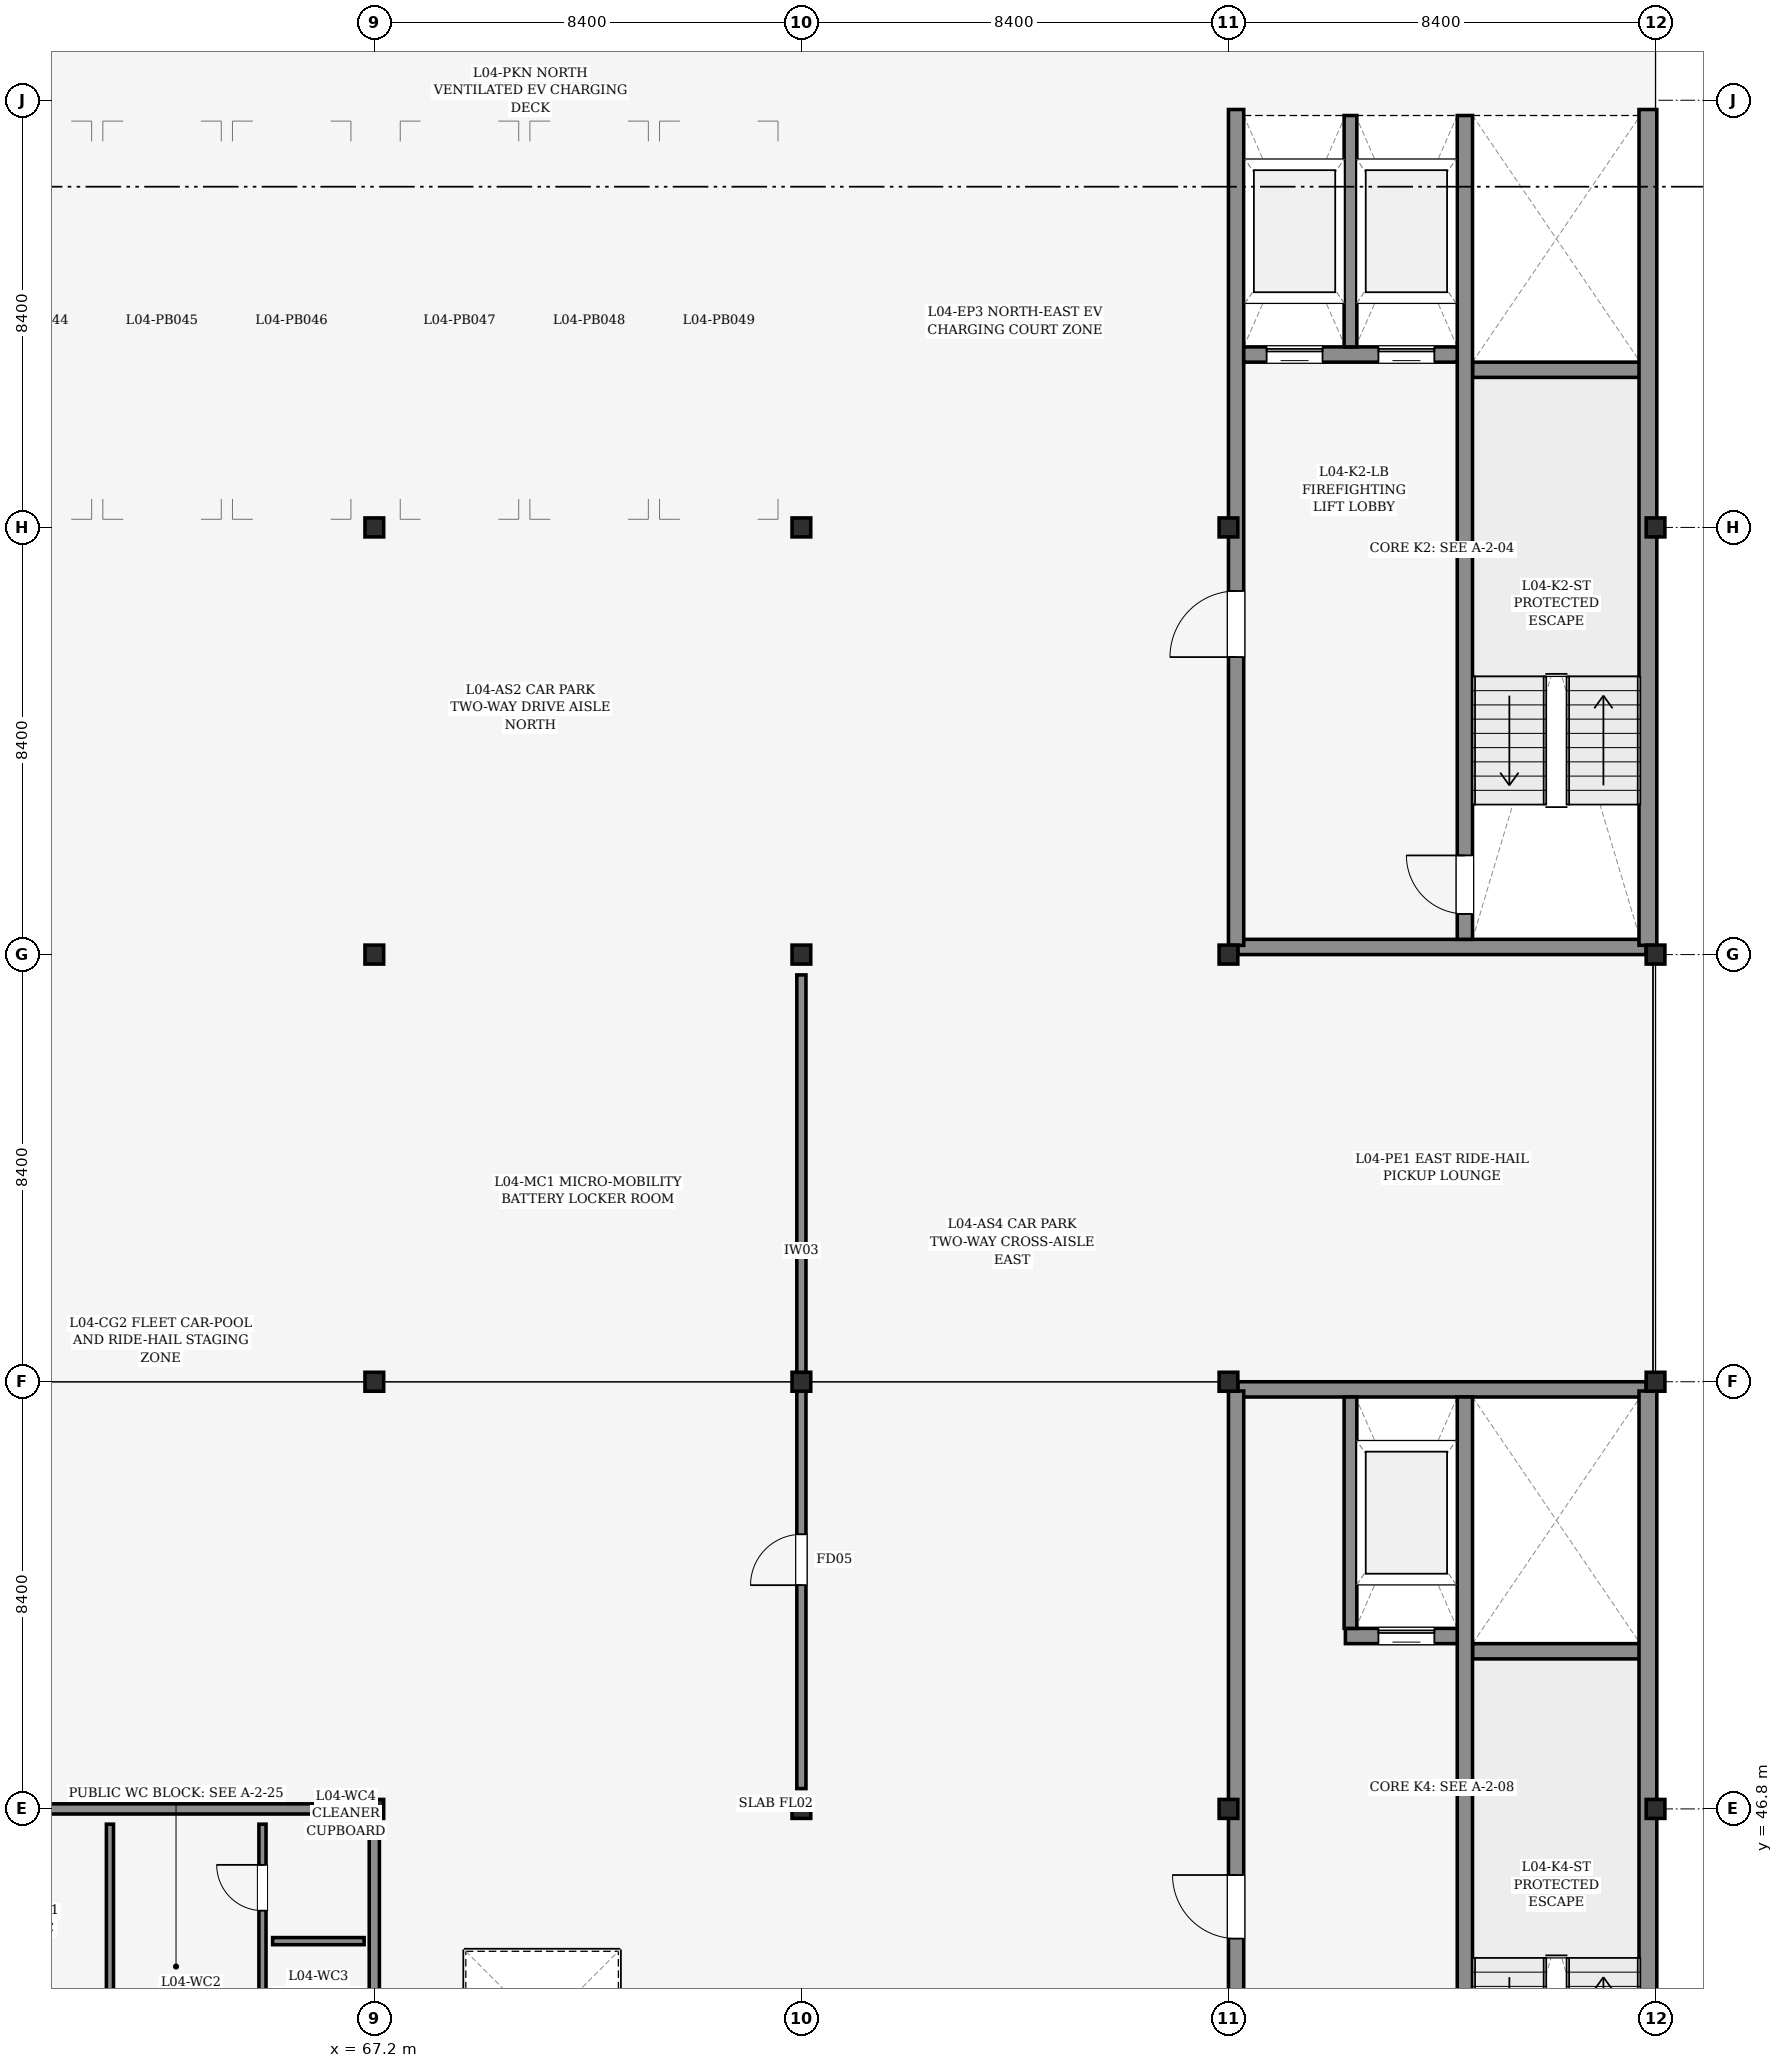
"""IFC4 building model, lengths in metres.
Left out: names, types, materials, properties, quantities, classifications, styles, units other than length and angle.
Written with IfcOpenShell. Run it as: python <this file> out.ifc"""

import sys

from ifc_helpers import new_model, si_unit, direction, frame, frame_2d, origin, origin_2d, place, context, subcontext, project, spatial, rectangle, i_section, extrude, element, fill, save


model = new_model("IFC4")
c1 = context("Model", 3, precision=1e-05, world=origin(), true_north=direction((0.0, 1.0)))
c2 = subcontext(c1, "Body", "Model", "MODEL_VIEW")
j1 = project(units=[si_unit("LENGTHUNIT", "METRE"), si_unit("PLANEANGLEUNIT", "RADIAN")], contexts=[c1])
p1 = place(None, origin())
s1 = spatial("IfcSite", under=j1, at=p1, CompositionType="ELEMENT")
p2 = place(p1, origin())
s2 = spatial("IfcBuilding", under=s1, at=p2, CompositionType="ELEMENT")
p3 = place(p2, frame((0.0, 0.0, 16.2)))
s3 = spatial("IfcBuildingStorey", under=s2, at=p3, CompositionType="ELEMENT", Elevation=16.2)
for number, where, z_axis, x_axis in (
    (1, (67.2, 46.8, 0.0), (0.0, 0.0, 1.0), (1.0, 0.0, 0.0)),
    (2, (67.2, 55.2, 0.0), (0.0, 0.0, 1.0), (1.0, 0.0, 0.0)),
    (3, (67.2, 63.6, 0.0), (0.0, 0.0, 1.0), (1.0, 0.0, 0.0)),
    (4, (67.2, 72.0, 0.0), (0.0, 0.0, 1.0), (1.0, 0.0, 0.0)),
    (5, (67.2, 80.4, 0.0), (0.0, 0.0, 1.0), (1.0, 0.0, 0.0)),
    (6, (75.6, 46.8, 0.0), (0.0, 0.0, 1.0), (1.0, 0.0, 0.0)),
    (7, (75.6, 55.2, 0.0), (0.0, 0.0, 1.0), (1.0, 0.0, 0.0)),
    (8, (75.6, 63.6, 0.0), (0.0, 0.0, 1.0), (1.0, 0.0, 0.0)),
    (9, (75.6, 72.0, 0.0), (0.0, 0.0, 1.0), (1.0, 0.0, 0.0)),
    (10, (75.6, 80.4, 0.0), (0.0, 0.0, 1.0), (1.0, 0.0, 0.0)),
    (11, (84.0, 46.8, 0.0), (0.0, 0.0, 1.0), (1.0, 0.0, 0.0)),
    (12, (84.0, 55.2, 0.0), (0.0, 0.0, 1.0), (1.0, 0.0, 0.0)),
    (13, (84.0, 63.6, 0.0), (0.0, 0.0, 1.0), (1.0, 0.0, 0.0)),
    (14, (84.0, 72.0, 0.0), (0.0, 0.0, 1.0), (1.0, 0.0, 0.0)),
    (15, (84.0, 80.4, 0.0), (0.0, 0.0, 1.0), (1.0, 0.0, 0.0)),
    (16, (92.4, 46.8, 0.0), (0.0, 0.0, 1.0), (1.0, 0.0, 0.0)),
    (17, (92.4, 55.2, 0.0), (0.0, 0.0, 1.0), (1.0, 0.0, 0.0)),
    (18, (92.4, 63.6, 0.0), (0.0, 0.0, 1.0), (1.0, 0.0, 0.0)),
    (19, (92.4, 72.0, 0.0), (0.0, 0.0, 1.0), (1.0, 0.0, 0.0)),
    (20, (92.4, 80.4, 0.0), (0.0, 0.0, 1.0), (1.0, 0.0, 0.0)),
):
    element("IfcColumn", number, at=place(p3, frame(where, z_axis=z_axis, x_axis=x_axis)), inside=s3, PredefinedType="COLUMN", context=c2, shape_type="SweptSolid", body=[
        extrude(i_section(OverallWidth=0.373, OverallDepth=0.368, WebThickness=0.014, FlangeThickness=0.024, FilletRadius=0.015, at=origin_2d()), origin(), (0.0, 0.0, 1.0), 3.6),
    ])
for number, where, z_axis, x_axis in (
    (21, (84.185, 63.75, 0.0), (0.0, 0.0, 1.0), (1.0, 0.0, 0.0)),
    (22, (84.185, 80.25, 0.0), (0.0, 0.0, 1.0), (1.0, 0.0, 0.0)),
):
    element("IfcWall", number, at=place(p3, frame(where, z_axis=z_axis, x_axis=x_axis)), inside=s3, PredefinedType="SHEAR", context=c2, shape_type="SweptSolid", body=[
        extrude(rectangle(XDim=8.031, YDim=0.3, at=frame_2d((4.016, 0.0))), origin(), (0.0, 0.0, 1.0), 3.38),
    ])
p4 = place(p3, frame((88.8, 75.1, 0.0), z_axis=(0.0, 0.0, 1.0), x_axis=(1.0, 0.0, 0.0)))
e23 = element("IfcWall", 23, at=p4, inside=s3, PredefinedType="SHEAR", context=c2, shape_type="SweptSolid", body=[
    extrude(rectangle(XDim=3.3, YDim=0.3, at=frame_2d((1.65, 0.0))), origin(), (0.0, 0.0, 1.0), 3.38),
])
p5 = place(p3, frame((92.25, 63.782, 0.0), z_axis=(0.0, 0.0, 1.0), x_axis=(0.0, 1.0, 0.0)))
e24 = element("IfcWall", 24, at=p5, inside=s3, PredefinedType="SHEAR", context=c2, shape_type="SweptSolid", body=[
    extrude(rectangle(XDim=16.436, YDim=0.35, at=frame_2d((8.218, 0.0))), origin(), (0.0, 0.0, 1.0), 3.38),
])
p6 = place(p3, frame((84.15, 63.782, 0.0), z_axis=(0.0, 0.0, 1.0), x_axis=(0.0, 1.0, 0.0)))
e25 = element("IfcWall", 25, at=p6, inside=s3, PredefinedType="SHEAR", context=c2, shape_type="SweptSolid", body=[
    extrude(rectangle(XDim=16.436, YDim=0.3, at=frame_2d((8.218, 0.0))), origin(), (0.0, 0.0, 1.0), 3.38),
])
p7 = place(p6, frame((5.668, 0.0, 0.0)))
e26 = element("IfcOpeningElement", 26, at=p7, cuts=e25, PredefinedType="OPENING", context=c2, shape_type="SweptSolid", body=[
    extrude(rectangle(XDim=1.3, YDim=2.2, at=frame_2d((0.65, 1.1))), frame((0.0, 0.16, 0.0), z_axis=(0.0, -1.0, 0.0), x_axis=(1.0, 0.0, 0.0)), (0.0, 0.0, 1.0), 0.32),
])
p8 = place(p3, frame((88.65, 63.9, 0.0), z_axis=(0.0, 0.0, 1.0), x_axis=(0.0, 1.0, 0.0)))
e27 = element("IfcWall", 27, at=p8, inside=s3, PredefinedType="SHEAR", context=c2, shape_type="SweptSolid", body=[
    extrude(rectangle(XDim=16.2, YDim=0.3, at=frame_2d((8.1, 0.0))), origin(), (0.0, 0.0, 1.0), 3.38),
])
p9 = place(p8, frame((0.5, 0.0, 0.0)))
e28 = element("IfcOpeningElement", 28, at=p9, cuts=e27, PredefinedType="OPENING", context=c2, shape_type="SweptSolid", body=[
    extrude(rectangle(XDim=1.15, YDim=2.15, at=frame_2d((0.575, 1.075))), frame((0.0, 0.16, 0.0), z_axis=(0.0, -1.0, 0.0), x_axis=(1.0, 0.0, 0.0)), (0.0, 0.0, 1.0), 0.32),
])
p10 = place(p3, frame((84.3, 75.4, 0.0), z_axis=(0.0, 0.0, 1.0), x_axis=(1.0, 0.0, 0.0)))
e29 = element("IfcWall", 29, at=p10, inside=s3, PredefinedType="SHEAR", context=c2, shape_type="SweptSolid", body=[
    extrude(rectangle(XDim=4.2, YDim=0.3, at=frame_2d((2.1, 0.0))), origin(), (0.0, 0.0, 1.0), 3.38),
])
p11 = place(p10, frame((0.45, 0.0, 0.0)))
e30 = element("IfcOpeningElement", 30, at=p11, cuts=e29, PredefinedType="OPENING", context=c2, shape_type="SweptSolid", body=[
    extrude(rectangle(XDim=1.1, YDim=2.2, at=frame_2d((0.55, 1.1))), frame((0.0, 0.16, 0.0), z_axis=(0.0, -1.0, 0.0), x_axis=(1.0, 0.0, 0.0)), (0.0, 0.0, 1.0), 0.32),
])
p12 = place(p10, frame((2.65, 0.0, 0.0)))
e31 = element("IfcOpeningElement", 31, at=p12, cuts=e29, PredefinedType="OPENING", context=c2, shape_type="SweptSolid", body=[
    extrude(rectangle(XDim=1.1, YDim=2.2, at=frame_2d((0.55, 1.1))), frame((0.0, 0.16, 0.0), z_axis=(0.0, -1.0, 0.0), x_axis=(1.0, 0.0, 0.0)), (0.0, 0.0, 1.0), 0.32),
])
p13 = place(p3, frame((86.4, 75.55, 0.0), z_axis=(0.0, 0.0, 1.0), x_axis=(0.0, 1.0, 0.0)))
e32 = element("IfcWall", 32, at=p13, inside=s3, PredefinedType="PARTITIONING", context=c2, shape_type="SweptSolid", body=[
    extrude(rectangle(XDim=4.55, YDim=0.25, at=frame_2d((2.275, 0.0))), origin(), (0.0, 0.0, 1.0), 2.525),
])
p14 = place(p3, frame((84.185, 55.05, 0.0), z_axis=(0.0, 0.0, 1.0), x_axis=(1.0, 0.0, 0.0)))
e33 = element("IfcWall", 33, at=p14, inside=s3, PredefinedType="SHEAR", context=c2, shape_type="SweptSolid", body=[
    extrude(rectangle(XDim=8.031, YDim=0.3, at=frame_2d((4.016, 0.0))), origin(), (0.0, 0.0, 1.0), 3.38),
])
p15 = place(p3, frame((88.8, 49.9, 0.0), z_axis=(0.0, 0.0, 1.0), x_axis=(1.0, 0.0, 0.0)))
e34 = element("IfcWall", 34, at=p15, inside=s3, PredefinedType="SHEAR", context=c2, shape_type="SweptSolid", body=[
    extrude(rectangle(XDim=3.3, YDim=0.3, at=frame_2d((1.65, 0.0))), origin(), (0.0, 0.0, 1.0), 3.38),
])
p16 = place(p3, frame((92.25, 38.582, 0.0), z_axis=(0.0, 0.0, 1.0), x_axis=(0.0, 1.0, 0.0)))
e35 = element("IfcWall", 35, at=p16, inside=s3, PredefinedType="SHEAR", context=c2, shape_type="SweptSolid", body=[
    extrude(rectangle(XDim=16.436, YDim=0.35, at=frame_2d((8.218, 0.0))), origin(), (0.0, 0.0, 1.0), 3.38),
])
p17 = place(p3, frame((84.15, 38.582, 0.0), z_axis=(0.0, 0.0, 1.0), x_axis=(0.0, 1.0, 0.0)))
e36 = element("IfcWall", 36, at=p17, inside=s3, PredefinedType="SHEAR", context=c2, shape_type="SweptSolid", body=[
    extrude(rectangle(XDim=16.436, YDim=0.3, at=frame_2d((8.218, 0.0))), origin(), (0.0, 0.0, 1.0), 3.38),
])
p18 = place(p17, frame((5.668, 0.0, 0.0)))
e37 = element("IfcOpeningElement", 37, at=p18, cuts=e36, PredefinedType="OPENING", context=c2, shape_type="SweptSolid", body=[
    extrude(rectangle(XDim=1.25, YDim=2.15, at=frame_2d((0.625, 1.075))), frame((0.0, 0.16, 0.0), z_axis=(0.0, -1.0, 0.0), x_axis=(1.0, 0.0, 0.0)), (0.0, 0.0, 1.0), 0.32),
])
p19 = place(p3, frame((88.65, 38.7, 0.0), z_axis=(0.0, 0.0, 1.0), x_axis=(0.0, 1.0, 0.0)))
e38 = element("IfcWall", 38, at=p19, inside=s3, PredefinedType="SHEAR", context=c2, shape_type="SweptSolid", body=[
    extrude(rectangle(XDim=16.2, YDim=0.3, at=frame_2d((8.1, 0.0))), origin(), (0.0, 0.0, 1.0), 3.38),
])
p20 = place(p19, frame((0.5, 0.0, 0.0)))
e39 = element("IfcOpeningElement", 39, at=p20, cuts=e38, PredefinedType="OPENING", context=c2, shape_type="SweptSolid", body=[
    extrude(rectangle(XDim=1.15, YDim=2.15, at=frame_2d((0.575, 1.075))), frame((0.0, 0.16, 0.0), z_axis=(0.0, -1.0, 0.0), x_axis=(1.0, 0.0, 0.0)), (0.0, 0.0, 1.0), 0.32),
])
p21 = place(p3, frame((86.3, 50.2, 0.0), z_axis=(0.0, 0.0, 1.0), x_axis=(1.0, 0.0, 0.0)))
e40 = element("IfcWall", 40, at=p21, inside=s3, PredefinedType="SHEAR", context=c2, shape_type="SweptSolid", body=[
    extrude(rectangle(XDim=2.2, YDim=0.3, at=frame_2d((1.1, 0.0))), origin(), (0.0, 0.0, 1.0), 3.38),
])
p22 = place(p21, frame((0.65, 0.0, 0.0)))
e41 = element("IfcOpeningElement", 41, at=p22, cuts=e40, PredefinedType="OPENING", context=c2, shape_type="SweptSolid", body=[
    extrude(rectangle(XDim=1.1, YDim=2.2, at=frame_2d((0.55, 1.1))), frame((0.0, 0.16, 0.0), z_axis=(0.0, -1.0, 0.0), x_axis=(1.0, 0.0, 0.0)), (0.0, 0.0, 1.0), 0.32),
])
p23 = place(p3, frame((86.4, 50.35, 0.0), z_axis=(0.0, 0.0, 1.0), x_axis=(0.0, 1.0, 0.0)))
e42 = element("IfcWall", 42, at=p23, inside=s3, PredefinedType="PARTITIONING", context=c2, shape_type="SweptSolid", body=[
    extrude(rectangle(XDim=4.55, YDim=0.25, at=frame_2d((2.275, 0.0))), origin(), (0.0, 0.0, 1.0), 2.525),
])
p24 = place(p3, frame((59.2, 46.8, 0.0), z_axis=(0.0, 0.0, 1.0), x_axis=(1.0, 0.0, 0.0)))
e43 = element("IfcWall", 43, at=p24, inside=s3, PredefinedType="PARTITIONING", context=c2, shape_type="SweptSolid", body=[
    extrude(rectangle(XDim=7.6, YDim=0.2, at=frame_2d((3.8, 0.0))), origin(), (0.0, 0.0, 1.0), 2.525),
])
p25 = place(p3, frame((67.2, 38.8, 0.0), z_axis=(0.0, 0.0, 1.0), x_axis=(0.0, 1.0, 0.0)))
e44 = element("IfcWall", 44, at=p25, inside=s3, PredefinedType="PARTITIONING", context=c2, shape_type="SweptSolid", body=[
    extrude(rectangle(XDim=7.6, YDim=0.2, at=frame_2d((3.8, 0.0))), origin(), (0.0, 0.0, 1.0), 2.525),
])
p26 = place(p3, frame((62.0, 40.8, 0.0), z_axis=(0.0, 0.0, 1.0), x_axis=(0.0, 1.0, 0.0)))
e45 = element("IfcWall", 45, at=p26, inside=s3, PredefinedType="PARTITIONING", context=c2, shape_type="SweptSolid", body=[
    extrude(rectangle(XDim=5.7, YDim=0.14, at=frame_2d((2.85, 0.0))), origin(), (0.0, 0.0, 1.0), 2.525),
])
p27 = place(p3, frame((65.0, 40.8, 0.0), z_axis=(0.0, 0.0, 1.0), x_axis=(0.0, 1.0, 0.0)))
e46 = element("IfcWall", 46, at=p27, inside=s3, PredefinedType="PARTITIONING", context=c2, shape_type="SweptSolid", body=[
    extrude(rectangle(XDim=5.7, YDim=0.14, at=frame_2d((2.85, 0.0))), origin(), (0.0, 0.0, 1.0), 2.525),
])
p28 = place(p27, frame((4.0, 0.0, 0.0)))
e47 = element("IfcOpeningElement", 47, at=p28, cuts=e46, PredefinedType="OPENING", context=c2, shape_type="SweptSolid", body=[
    extrude(rectangle(XDim=0.9, YDim=2.05, at=frame_2d((0.45, 1.025))), frame((0.0, 0.08, 0.0), z_axis=(0.0, -1.0, 0.0), x_axis=(1.0, 0.0, 0.0)), (0.0, 0.0, 1.0), 0.16),
])
p29 = place(p3, frame((65.2, 44.2, 0.0), z_axis=(0.0, 0.0, 1.0), x_axis=(1.0, 0.0, 0.0)))
e48 = element("IfcWall", 48, at=p29, inside=s3, PredefinedType="PARTITIONING", context=c2, shape_type="SweptSolid", body=[
    extrude(rectangle(XDim=1.8, YDim=0.14, at=frame_2d((0.9, 0.0))), origin(), (0.0, 0.0, 1.0), 2.525),
])
p30 = place(p3, frame((75.6, 47.2, 0.0), z_axis=(0.0, 0.0, 1.0), x_axis=(0.0, 1.0, 0.0)))
e49 = element("IfcWall", 49, at=p30, inside=s3, PredefinedType="PARTITIONING", context=c2, shape_type="SweptSolid", body=[
    extrude(rectangle(XDim=16.0, YDim=0.18, at=frame_2d((8.0, 0.0))), origin(), (0.0, 0.0, 1.0), 2.525),
])
p31 = place(p30, frame((4.0, 0.0, 0.0)))
e50 = element("IfcOpeningElement", 50, at=p31, cuts=e49, PredefinedType="OPENING", context=c2, shape_type="SweptSolid", body=[
    extrude(rectangle(XDim=1.0, YDim=2.15, at=frame_2d((0.5, 1.075))), frame((0.0, 0.1, 0.0), z_axis=(0.0, -1.0, 0.0), x_axis=(1.0, 0.0, 0.0)), (0.0, 0.0, 1.0), 0.2),
])
p32 = place(p7, origin())
e51 = element("IfcDoor", 51, at=p32, inside=s3, OperationType="SINGLE_SWING_LEFT", PredefinedType="DOOR", context=c2, shape_type="SweptSolid", body=[
    extrude(rectangle(XDim=1.3, YDim=2.2, at=frame_2d((0.65, 1.1))), frame((0.0, 0.025, 0.0), z_axis=(0.0, -1.0, 0.0), x_axis=(1.0, 0.0, 0.0)), (0.0, 0.0, 1.0), 0.05),
])
fill(e26, e51)
p33 = place(p9, origin())
e52 = element("IfcDoor", 52, at=p33, inside=s3, OperationType="SINGLE_SWING_RIGHT", PredefinedType="DOOR", context=c2, shape_type="SweptSolid", body=[
    extrude(rectangle(XDim=1.15, YDim=2.15, at=frame_2d((0.575, 1.075))), frame((0.0, 0.025, 0.0), z_axis=(0.0, -1.0, 0.0), x_axis=(1.0, 0.0, 0.0)), (0.0, 0.0, 1.0), 0.05),
])
fill(e28, e52)
p34 = place(p11, origin())
e53 = element("IfcDoor", 53, at=p34, inside=s3, OperationType="SLIDING_TO_LEFT", PredefinedType="DOOR", context=c2, shape_type="SweptSolid", body=[
    extrude(rectangle(XDim=1.1, YDim=2.2, at=frame_2d((0.55, 1.1))), frame((0.0, 0.025, 0.0), z_axis=(0.0, -1.0, 0.0), x_axis=(1.0, 0.0, 0.0)), (0.0, 0.0, 1.0), 0.05),
])
fill(e30, e53)
p35 = place(p12, origin())
e54 = element("IfcDoor", 54, at=p35, inside=s3, OperationType="SLIDING_TO_LEFT", PredefinedType="DOOR", context=c2, shape_type="SweptSolid", body=[
    extrude(rectangle(XDim=1.1, YDim=2.2, at=frame_2d((0.55, 1.1))), frame((0.0, 0.025, 0.0), z_axis=(0.0, -1.0, 0.0), x_axis=(1.0, 0.0, 0.0)), (0.0, 0.0, 1.0), 0.05),
])
fill(e31, e54)
p36 = place(p18, origin())
e55 = element("IfcDoor", 55, at=p36, inside=s3, OperationType="SINGLE_SWING_RIGHT", PredefinedType="DOOR", context=c2, shape_type="SweptSolid", body=[
    extrude(rectangle(XDim=1.25, YDim=2.15, at=frame_2d((0.625, 1.075))), frame((0.0, 0.025, 0.0), z_axis=(0.0, -1.0, 0.0), x_axis=(1.0, 0.0, 0.0)), (0.0, 0.0, 1.0), 0.05),
])
fill(e37, e55)
p37 = place(p22, origin())
e56 = element("IfcDoor", 56, at=p37, inside=s3, OperationType="SLIDING_TO_LEFT", PredefinedType="DOOR", context=c2, shape_type="SweptSolid", body=[
    extrude(rectangle(XDim=1.1, YDim=2.2, at=frame_2d((0.55, 1.1))), frame((0.0, 0.025, 0.0), z_axis=(0.0, -1.0, 0.0), x_axis=(1.0, 0.0, 0.0)), (0.0, 0.0, 1.0), 0.05),
])
fill(e41, e56)
p38 = place(p28, origin())
e57 = element("IfcDoor", 57, at=p38, inside=s3, OperationType="SINGLE_SWING_RIGHT", PredefinedType="DOOR", context=c2, shape_type="SweptSolid", body=[
    extrude(rectangle(XDim=0.9, YDim=2.05, at=frame_2d((0.45, 1.025))), frame((0.0, 0.025, 0.0), z_axis=(0.0, -1.0, 0.0), x_axis=(1.0, 0.0, 0.0)), (0.0, 0.0, 1.0), 0.05),
])
fill(e47, e57)
p39 = place(p31, origin())
e58 = element("IfcDoor", 58, at=p39, inside=s3, OperationType="SINGLE_SWING_LEFT", PredefinedType="DOOR", context=c2, shape_type="SweptSolid", body=[
    extrude(rectangle(XDim=1.0, YDim=2.15, at=frame_2d((0.5, 1.075))), frame((0.0, 0.025, 0.0), z_axis=(0.0, -1.0, 0.0), x_axis=(1.0, 0.0, 0.0)), (0.0, 0.0, 1.0), 0.05),
])
fill(e50, e58)
save(model, sys.argv[1])
